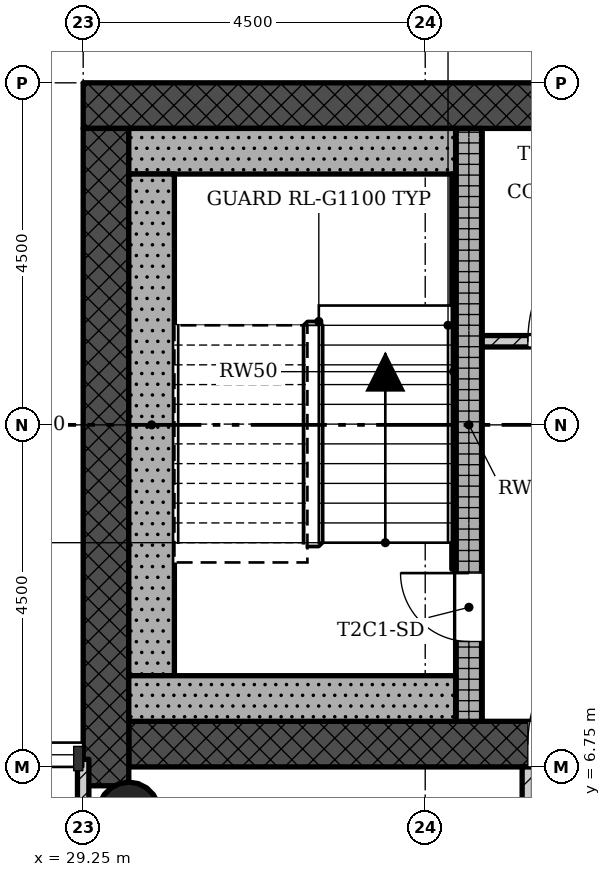
"""IFC4 building model, lengths in metres.
Left out: names, types, materials, properties, quantities, classifications, styles, units other than length and angle.
Written with IfcOpenShell. Run it as: python <this file> out.ifc"""

import sys

from ifc_helpers import new_model, si_unit, direction, frame, frame_2d, origin, origin_2d, place, context, subcontext, project, spatial, rectangle, hollow_circle, extrude, element, fill, save


model = new_model("IFC4")
c1 = context("Model", 3, precision=1e-05, world=origin(), true_north=direction((0.0, 1.0)))
c2 = subcontext(c1, "Body", "Model", "MODEL_VIEW")
j1 = project(units=[si_unit("LENGTHUNIT", "METRE"), si_unit("PLANEANGLEUNIT", "RADIAN")], contexts=[c1])
p1 = place(None, origin())
s1 = spatial("IfcSite", under=j1, at=p1, CompositionType="ELEMENT")
p2 = place(p1, origin())
s2 = spatial("IfcBuilding", under=s1, at=p2, CompositionType="ELEMENT")
p3 = place(p2, frame((0.0, 0.0, 233.4)))
s3 = spatial("IfcBuildingStorey", under=s2, at=p3, CompositionType="ELEMENT", Elevation=233.4)
p4 = place(p3, frame((29.85, 7.05, 0.0), z_axis=(0.0, 0.0, 1.0), x_axis=(1.0, 0.0, 0.0)))
e1 = element("IfcWall", 1, at=p4, inside=s3, PredefinedType="SHEAR", context=c2, shape_type="SweptSolid", body=[
    extrude(rectangle(XDim=12.9, YDim=0.6, at=frame_2d((6.45, 0.0))), origin(), (0.0, 0.0, 1.0), 4.5),
])
p5 = place(p4, frame((5.25, 0.0, 0.0)))
e2 = element("IfcOpeningElement", 2, at=p5, cuts=e1, PredefinedType="OPENING", context=c2, shape_type="SweptSolid", body=[
    extrude(rectangle(XDim=1.8, YDim=2.1, at=frame_2d((0.9, 1.05))), frame((0.0, 0.31, 0.0), z_axis=(0.0, -1.0, 0.0), x_axis=(1.0, 0.0, 0.0)), (0.0, 0.0, 1.0), 0.62),
])
p6 = place(p3, frame((42.15, 15.45, 0.0), z_axis=(0.0, 0.0, 1.0), x_axis=(-1.0, 0.0, 0.0)))
e3 = element("IfcWall", 3, at=p6, inside=s3, PredefinedType="SHEAR", context=c2, shape_type="SweptSolid", body=[
    extrude(rectangle(XDim=12.9, YDim=0.6, at=frame_2d((6.45, 0.0))), origin(), (0.0, 0.0, 1.0), 4.5),
])
p7 = place(p6, frame((5.7, 0.0, 0.45)))
e4 = element("IfcOpeningElement", 4, at=p7, cuts=e3, PredefinedType="OPENING", context=c2, shape_type="SweptSolid", body=[
    extrude(rectangle(XDim=0.9, YDim=2.4, at=frame_2d((0.45, 1.2))), frame((0.0, 0.31, 0.0), z_axis=(0.0, -1.0, 0.0), x_axis=(1.0, 0.0, 0.0)), (0.0, 0.0, 1.0), 0.62),
])
p8 = place(p3, frame((29.55, 15.15, 0.0), z_axis=(0.0, 0.0, 1.0), x_axis=(0.0, -1.0, 0.0)))
e5 = element("IfcWall", 5, at=p8, inside=s3, PredefinedType="SHEAR", context=c2, shape_type="SweptSolid", body=[
    extrude(rectangle(XDim=8.648, YDim=0.6, at=frame_2d((4.324, 0.0))), origin(), (0.0, 0.0, 1.0), 4.5),
])
p9 = place(p3, frame((34.325, 7.35, 0.0), z_axis=(0.0, 0.0, 1.0), x_axis=(0.0, 1.0, 0.0)))
e6 = element("IfcWall", 6, at=p9, inside=s3, PredefinedType="SHEAR", context=c2, shape_type="SweptSolid", body=[
    extrude(rectangle(XDim=7.8, YDim=0.35, at=frame_2d((3.9, 0.0))), origin(), (0.0, 0.0, 1.0), 4.5),
])
p10 = place(p9, frame((1.05, 0.0, 0.0)))
e7 = element("IfcOpeningElement", 7, at=p10, cuts=e6, PredefinedType="OPENING", context=c2, shape_type="SweptSolid", body=[
    extrude(rectangle(XDim=0.9, YDim=2.1, at=frame_2d((0.45, 1.05))), frame((0.0, 0.185, 0.0), z_axis=(0.0, -1.0, 0.0), x_axis=(1.0, 0.0, 0.0)), (0.0, 0.0, 1.0), 0.37),
])
p11 = place(p3, frame((29.85, 6.15, 0.0), z_axis=(0.0, 0.0, 1.0), x_axis=(1.0, 0.0, 0.0)))
e8 = element("IfcColumn", 8, at=p11, inside=s3, PredefinedType="COLUMN", context=c2, shape_type="SweptSolid", body=[
    extrude(hollow_circle(Radius=0.4, WallThickness=0.028, at=origin_2d()), origin(), (0.0, 0.0, 1.0), 4.5),
])
p12 = place(p3, frame((37.5, 12.35, 0.0), z_axis=(0.0, 0.0, 1.0), x_axis=(-1.0, 0.0, 0.0)))
e9 = element("IfcWall", 9, at=p12, inside=s3, PredefinedType="PARTITIONING", context=c2, shape_type="SweptSolid", body=[
    extrude(rectangle(XDim=3.0, YDim=0.15, at=frame_2d((1.5, 0.0))), origin(), (0.0, 0.0, 1.0), 4.1),
])
p13 = place(p12, frame((0.6, 0.0, 0.0)))
e10 = element("IfcOpeningElement", 10, at=p13, cuts=e9, PredefinedType="OPENING", context=c2, shape_type="SweptSolid", body=[
    extrude(rectangle(XDim=1.8, YDim=2.1, at=frame_2d((0.9, 1.05))), frame((0.0, 0.085, 0.0), z_axis=(0.0, -1.0, 0.0), x_axis=(1.0, 0.0, 0.0)), (0.0, 0.0, 1.0), 0.17),
])
p14 = place(p3, frame((35.1, 0.9, 0.0), z_axis=(0.0, 0.0, 1.0), x_axis=(0.0, 1.0, 0.0)))
e11 = element("IfcWall", 11, at=p14, inside=s3, PredefinedType="PARTITIONING", context=c2, shape_type="SweptSolid", body=[
    extrude(rectangle(XDim=5.85, YDim=0.15, at=frame_2d((2.925, 0.0))), origin(), (0.0, 0.0, 1.0), 4.1),
])
p15 = place(p14, frame((2.475, 0.0, 0.0)))
e12 = element("IfcOpeningElement", 12, at=p15, cuts=e11, PredefinedType="OPENING", context=c2, shape_type="SweptSolid", body=[
    extrude(rectangle(XDim=0.9, YDim=2.1, at=frame_2d((0.45, 1.05))), frame((0.0, 0.085, 0.0), z_axis=(0.0, -1.0, 0.0), x_axis=(1.0, 0.0, 0.0)), (0.0, 0.0, 1.0), 0.17),
])
p16 = place(p3, frame((29.25, -6.85, 0.0), z_axis=(0.0, 0.0, 1.0), x_axis=(0.0, 1.0, 0.0)))
e13 = element("IfcWall", 13, at=p16, inside=s3, PredefinedType="PARTITIONING", context=c2, shape_type="SweptSolid", body=[
    extrude(rectangle(XDim=13.7, YDim=0.15, at=frame_2d((6.85, 0.0))), origin(), (0.0, 0.0, 1.0), 4.1),
])
p17 = place(p16, frame((5.95, 0.0, 0.0)))
e14 = element("IfcOpeningElement", 14, at=p17, cuts=e13, PredefinedType="OPENING", context=c2, shape_type="SweptSolid", body=[
    extrude(rectangle(XDim=1.8, YDim=2.1, at=frame_2d((0.9, 1.05))), frame((0.0, 0.085, 0.0), z_axis=(0.0, -1.0, 0.0), x_axis=(1.0, 0.0, 0.0)), (0.0, 0.0, 1.0), 0.17),
])
p18 = place(p3, frame((34.15, 14.85, 0.0), z_axis=(0.0, 0.0, 1.0), x_axis=(-1.0, 0.0, 0.0)))
e15 = element("IfcWall", 15, at=p18, inside=s3, PredefinedType="SHEAR", context=c2, shape_type="SweptSolid", body=[
    extrude(rectangle(XDim=4.3, YDim=0.6, at=frame_2d((2.15, 0.0))), origin(), (0.0, 0.0, 1.0), 4.5),
])
p19 = place(p3, frame((30.15, 7.95, 0.0), z_axis=(0.0, 0.0, 1.0), x_axis=(0.0, 1.0, 0.0)))
e16 = element("IfcWall", 16, at=p19, inside=s3, PredefinedType="SHEAR", context=c2, shape_type="SweptSolid", body=[
    extrude(rectangle(XDim=6.6, YDim=0.6, at=frame_2d((3.3, 0.0))), origin(), (0.0, 0.0, 1.0), 4.5),
])
p20 = place(p3, frame((34.15, 7.65, 0.0), z_axis=(0.0, 0.0, 1.0), x_axis=(-1.0, 0.0, 0.0)))
e17 = element("IfcWall", 17, at=p20, inside=s3, PredefinedType="SHEAR", context=c2, shape_type="SweptSolid", body=[
    extrude(rectangle(XDim=4.3, YDim=0.6, at=frame_2d((2.15, 0.0))), origin(), (0.0, 0.0, 1.0), 4.5),
])
p21 = place(p3, frame((34.125, 9.35, 0.0), z_axis=(0.0, 0.0, 1.0), x_axis=(0.0, 1.0, 0.0)))
e18 = element("IfcWall", 18, at=p21, inside=s3, PredefinedType="SHEAR", context=c2, shape_type="SweptSolid", body=[
    extrude(rectangle(XDim=5.2, YDim=0.05, at=frame_2d((2.6, 0.0))), origin(), (0.0, 0.0, 1.0), 4.5),
])
p22 = place(p13, origin())
e19 = element("IfcDoor", 19, at=p22, inside=s3, OperationType="SINGLE_SWING_LEFT", PredefinedType="DOOR", context=c2, shape_type="SweptSolid", body=[
    extrude(rectangle(XDim=1.8, YDim=2.1, at=frame_2d((0.9, 1.05))), frame((0.0, 0.025, 0.0), z_axis=(0.0, -1.0, 0.0), x_axis=(1.0, 0.0, 0.0)), (0.0, 0.0, 1.0), 0.05),
])
fill(e10, e19)
p23 = place(p10, origin())
e20 = element("IfcDoor", 20, at=p23, inside=s3, OperationType="SINGLE_SWING_LEFT", PredefinedType="DOOR", context=c2, shape_type="SweptSolid", body=[
    extrude(rectangle(XDim=0.9, YDim=2.1, at=frame_2d((0.45, 1.05))), frame((0.0, 0.025, 0.0), z_axis=(0.0, -1.0, 0.0), x_axis=(1.0, 0.0, 0.0)), (0.0, 0.0, 1.0), 0.05),
])
fill(e7, e20)
p24 = place(p5, origin())
e21 = element("IfcDoor", 21, at=p24, inside=s3, OperationType="SINGLE_SWING_LEFT", PredefinedType="DOOR", context=c2, shape_type="SweptSolid", body=[
    extrude(rectangle(XDim=1.8, YDim=2.1, at=frame_2d((0.9, 1.05))), frame((0.0, 0.025, 0.0), z_axis=(0.0, -1.0, 0.0), x_axis=(1.0, 0.0, 0.0)), (0.0, 0.0, 1.0), 0.05),
])
fill(e2, e21)
save(model, sys.argv[1])
